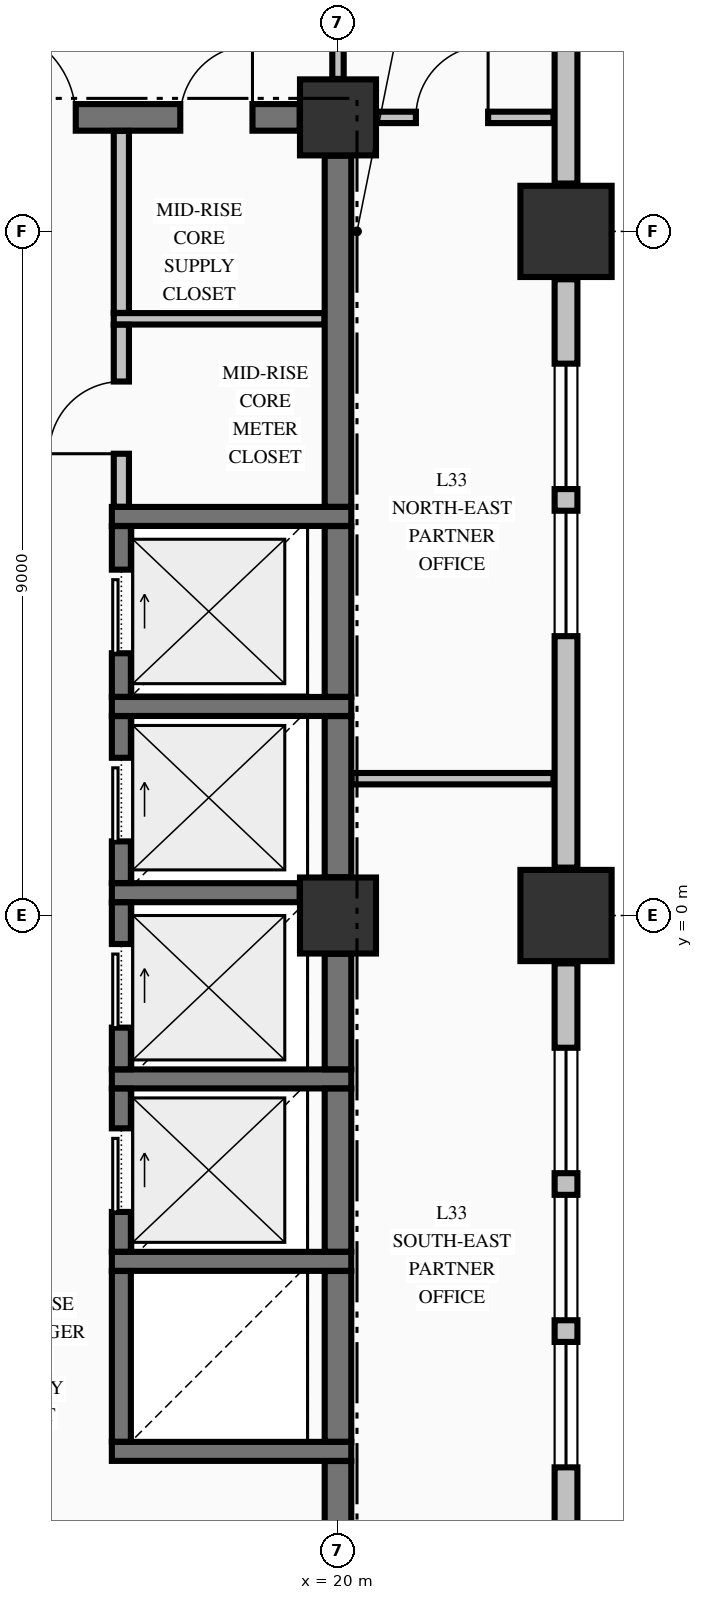
"""IFC4 building model, lengths in metres.
Left out: names, types, materials, properties, quantities, classifications, styles, units other than length and angle.
Written with IfcOpenShell. Run it as: python <this file> out.ifc"""

import sys

from ifc_helpers import new_model, si_unit, direction, frame, frame_2d, origin, origin_2d, place, context, subcontext, project, spatial, rectangle, extrude, element, fill, save


model = new_model("IFC4")
c1 = context("Model", 3, precision=1e-05, world=origin(), true_north=direction((0.0, 1.0)))
c2 = subcontext(c1, "Body", "Model", "MODEL_VIEW")
j1 = project(units=[si_unit("LENGTHUNIT", "METRE"), si_unit("PLANEANGLEUNIT", "RADIAN")], contexts=[c1])
p1 = place(None, origin())
s1 = spatial("IfcSite", under=j1, at=p1, CompositionType="ELEMENT")
p2 = place(p1, origin())
s2 = spatial("IfcBuilding", under=s1, at=p2, CompositionType="ELEMENT")
p3 = place(p2, frame((0.0, 0.0, 132.06)))
s3 = spatial("IfcBuildingStorey", under=s2, at=p3, CompositionType="ELEMENT", Elevation=132.06)
for number, where, z_axis, x_axis in (
    (1, (23.0, 0.0, -0.25), (0.0, 0.0, 1.0), (1.0, 0.0, 0.0)),
    (2, (23.0, 9.0, -0.25), (0.0, 0.0, 1.0), (1.0, 0.0, 0.0)),
):
    element("IfcColumn", number, at=place(p3, frame(where, z_axis=z_axis, x_axis=x_axis)), inside=s3, PredefinedType="COLUMN", context=c2, shape_type="SweptSolid", body=[
        extrude(rectangle(XDim=1.2, YDim=1.2, at=origin_2d()), origin(), (0.0, 0.0, 1.0), 3.57),
    ])
for number, where, z_axis, x_axis in (
    (3, (20.0, 10.5, -0.25), (0.0, 0.0, 1.0), (1.0, 0.0, 0.0)),
    (4, (20.0, 0.0, -0.25), (0.0, 0.0, 1.0), (1.0, 0.0, 0.0)),
):
    element("IfcColumn", number, at=place(p3, frame(where, z_axis=z_axis, x_axis=x_axis)), inside=s3, PredefinedType="COLUMN", context=c2, shape_type="SweptSolid", body=[
        extrude(rectangle(XDim=1.0, YDim=1.0, at=origin_2d()), origin(), (0.0, 0.0, 1.0), 3.57),
    ])
p4 = place(p3, frame((23.0, -8.37, 0.0), z_axis=(0.0, 0.0, 1.0), x_axis=(0.0, 1.0, 0.0)))
e5 = element("IfcWall", 5, at=p4, inside=s3, PredefinedType="STANDARD", context=c2, shape_type="SweptSolid", body=[
    extrude(rectangle(XDim=7.74, YDim=0.3, at=frame_2d((3.87, 0.0))), origin(), (0.0, 0.0, 1.0), 2.712),
])
p5 = place(p4, frame((1.11, 0.0, 0.8)))
e6 = element("IfcOpeningElement", 6, at=p5, cuts=e5, PredefinedType="OPENING", context=c2, shape_type="SweptSolid", body=[
    extrude(rectangle(XDim=1.65, YDim=1.7, at=frame_2d((0.825, 0.85))), frame((0.0, 0.16, 0.0), z_axis=(0.0, -1.0, 0.0), x_axis=(1.0, 0.0, 0.0)), (0.0, 0.0, 1.0), 0.32),
])
p6 = place(p4, frame((3.045, 0.0, 0.8)))
e7 = element("IfcOpeningElement", 7, at=p6, cuts=e5, PredefinedType="OPENING", context=c2, shape_type="SweptSolid", body=[
    extrude(rectangle(XDim=1.65, YDim=1.7, at=frame_2d((0.825, 0.85))), frame((0.0, 0.16, 0.0), z_axis=(0.0, -1.0, 0.0), x_axis=(1.0, 0.0, 0.0)), (0.0, 0.0, 1.0), 0.32),
])
p7 = place(p4, frame((4.98, 0.0, 0.8)))
e8 = element("IfcOpeningElement", 8, at=p7, cuts=e5, PredefinedType="OPENING", context=c2, shape_type="SweptSolid", body=[
    extrude(rectangle(XDim=1.65, YDim=1.7, at=frame_2d((0.825, 0.85))), frame((0.0, 0.16, 0.0), z_axis=(0.0, -1.0, 0.0), x_axis=(1.0, 0.0, 0.0)), (0.0, 0.0, 1.0), 0.32),
])
p8 = place(p3, frame((23.0, 0.63, 0.0), z_axis=(0.0, 0.0, 1.0), x_axis=(0.0, 1.0, 0.0)))
e9 = element("IfcWall", 9, at=p8, inside=s3, PredefinedType="STANDARD", context=c2, shape_type="SweptSolid", body=[
    extrude(rectangle(XDim=7.74, YDim=0.3, at=frame_2d((3.87, 0.0))), origin(), (0.0, 0.0, 1.0), 2.712),
])
p9 = place(p8, frame((3.045, 0.0, 0.8)))
e10 = element("IfcOpeningElement", 10, at=p9, cuts=e9, PredefinedType="OPENING", context=c2, shape_type="SweptSolid", body=[
    extrude(rectangle(XDim=1.65, YDim=1.7, at=frame_2d((0.825, 0.85))), frame((0.0, 0.16, 0.0), z_axis=(0.0, -1.0, 0.0), x_axis=(1.0, 0.0, 0.0)), (0.0, 0.0, 1.0), 0.32),
])
p10 = place(p8, frame((4.98, 0.0, 0.8)))
e11 = element("IfcOpeningElement", 11, at=p10, cuts=e9, PredefinedType="OPENING", context=c2, shape_type="SweptSolid", body=[
    extrude(rectangle(XDim=1.65, YDim=1.7, at=frame_2d((0.825, 0.85))), frame((0.0, 0.16, 0.0), z_axis=(0.0, -1.0, 0.0), x_axis=(1.0, 0.0, 0.0)), (0.0, 0.0, 1.0), 0.32),
])
p11 = place(p3, frame((23.0, 9.63, 0.0), z_axis=(0.0, 0.0, 1.0), x_axis=(0.0, 1.0, 0.0)))
e12 = element("IfcWall", 12, at=p11, inside=s3, PredefinedType="STANDARD", context=c2, shape_type="SweptSolid", body=[
    extrude(rectangle(XDim=10.74, YDim=0.3, at=frame_2d((5.37, 0.0))), origin(), (0.0, 0.0, 1.0), 2.712),
])
for number, where, z_axis, x_axis in (
    (13, (17.025, -7.05, 0.0), (0.0, 0.0, 1.0), (1.0, 0.0, 0.0)),
    (14, (17.025, -4.55, 0.0), (0.0, 0.0, 1.0), (1.0, 0.0, 0.0)),
    (15, (17.025, -2.15, 0.0), (0.0, 0.0, 1.0), (1.0, 0.0, 0.0)),
):
    element("IfcWall", number, at=place(p3, frame(where, z_axis=z_axis, x_axis=x_axis)), inside=s3, PredefinedType="SOLIDWALL", context=c2, shape_type="SweptSolid", body=[
        extrude(rectangle(XDim=3.15, YDim=0.25, at=frame_2d((1.575, 0.0))), origin(), (0.0, 0.0, 1.0), 3.32),
    ])
p12 = place(p3, frame((17.025, 0.3, 0.0), z_axis=(0.0, 0.0, 1.0), x_axis=(1.0, 0.0, 0.0)))
e16 = element("IfcWall", 16, at=p12, inside=s3, PredefinedType="SOLIDWALL", context=c2, shape_type="SweptSolid", body=[
    extrude(rectangle(XDim=2.471, YDim=0.25, at=frame_2d((1.236, 0.0))), origin(), (0.0, 0.0, 1.0), 3.32),
])
for number, where, z_axis, x_axis in (
    (17, (17.025, 2.75, 0.0), (0.0, 0.0, 1.0), (1.0, 0.0, 0.0)),
    (18, (17.025, 5.25, 0.0), (0.0, 0.0, 1.0), (1.0, 0.0, 0.0)),
):
    element("IfcWall", number, at=place(p3, frame(where, z_axis=z_axis, x_axis=x_axis)), inside=s3, PredefinedType="SOLIDWALL", context=c2, shape_type="SweptSolid", body=[
        extrude(rectangle(XDim=3.15, YDim=0.25, at=frame_2d((1.575, 0.0))), origin(), (0.0, 0.0, 1.0), 3.32),
    ])
p13 = place(p3, frame((14.7, 10.5, 0.0), z_axis=(0.0, 0.0, 1.0), x_axis=(1.0, 0.0, 0.0)))
e19 = element("IfcWall", 19, at=p13, inside=s3, PredefinedType="SHEAR", context=c2, shape_type="SweptSolid", body=[
    extrude(rectangle(XDim=4.796, YDim=0.35, at=frame_2d((2.398, 0.0))), origin(), (0.0, 0.0, 1.0), 3.32),
])
p14 = place(p13, frame((0.65, 0.0, 0.0)))
e20 = element("IfcOpeningElement", 20, at=p14, cuts=e19, PredefinedType="OPENING", context=c2, shape_type="SweptSolid", body=[
    extrude(rectangle(XDim=1.2, YDim=2.15, at=frame_2d((0.6, 1.075))), frame((0.0, 0.185, 0.0), z_axis=(0.0, -1.0, 0.0), x_axis=(1.0, 0.0, 0.0)), (0.0, 0.0, 1.0), 0.37),
])
p15 = place(p13, frame((3.225, 0.0, 0.0)))
e21 = element("IfcOpeningElement", 21, at=p15, cuts=e19, PredefinedType="OPENING", context=c2, shape_type="SweptSolid", body=[
    extrude(rectangle(XDim=0.95, YDim=2.15, at=frame_2d((0.475, 1.075))), frame((0.0, 0.185, 0.0), z_axis=(0.0, -1.0, 0.0), x_axis=(1.0, 0.0, 0.0)), (0.0, 0.0, 1.0), 0.37),
])
p16 = place(p3, frame((20.178, 1.8, 0.0), z_axis=(0.0, 0.0, 1.0), x_axis=(1.0, 0.0, 0.0)))
e22 = element("IfcWall", 22, at=p16, inside=s3, PredefinedType="PARTITIONING", context=c2, shape_type="SweptSolid", body=[
    extrude(rectangle(XDim=2.657, YDim=0.15, at=frame_2d((1.329, 0.0))), origin(), (0.0, 0.0, 1.0), 3.32),
])
p17 = place(p3, frame((17.05, 7.85, 0.0), z_axis=(0.0, 0.0, 1.0), x_axis=(1.0, 0.0, 0.0)))
e23 = element("IfcWall", 23, at=p17, inside=s3, PredefinedType="PARTITIONING", context=c2, shape_type="SweptSolid", body=[
    extrude(rectangle(XDim=2.772, YDim=0.15, at=frame_2d((1.386, 0.0))), origin(), (0.0, 0.0, 1.0), 3.32),
])
p18 = place(p3, frame((20.506, 10.5, 0.0), z_axis=(0.0, 0.0, 1.0), x_axis=(1.0, 0.0, 0.0)))
e24 = element("IfcWall", 24, at=p18, inside=s3, PredefinedType="PARTITIONING", context=c2, shape_type="SweptSolid", body=[
    extrude(rectangle(XDim=2.329, YDim=0.15, at=frame_2d((1.165, 0.0))), origin(), (0.0, 0.0, 1.0), 3.32),
])
p19 = place(p18, frame((0.519, 0.0, 0.0)))
e25 = element("IfcOpeningElement", 25, at=p19, cuts=e24, PredefinedType="OPENING", context=c2, shape_type="SweptSolid", body=[
    extrude(rectangle(XDim=0.95, YDim=2.15, at=frame_2d((0.475, 1.075))), frame((0.0, 0.085, 0.0), z_axis=(0.0, -1.0, 0.0), x_axis=(1.0, 0.0, 0.0)), (0.0, 0.0, 1.0), 0.17),
])
p20 = place(p3, frame((17.15, -6.923, 0.0), z_axis=(0.0, 0.0, 1.0), x_axis=(0.0, 1.0, 0.0)))
e26 = element("IfcWall", 26, at=p20, inside=s3, PredefinedType="SOLIDWALL", context=c2, shape_type="SweptSolid", body=[
    extrude(rectangle(XDim=2.246, YDim=0.25, at=frame_2d((1.123, 0.0))), origin(), (0.0, 0.0, 1.0), 3.32),
])
p21 = place(p3, frame((17.15, -4.423, 0.0), z_axis=(0.0, 0.0, 1.0), x_axis=(0.0, 1.0, 0.0)))
e27 = element("IfcWall", 27, at=p21, inside=s3, PredefinedType="SOLIDWALL", context=c2, shape_type="SweptSolid", body=[
    extrude(rectangle(XDim=2.146, YDim=0.25, at=frame_2d((1.073, 0.0))), origin(), (0.0, 0.0, 1.0), 3.32),
])
p22 = place(p21, frame((0.523, 0.0, 0.0)))
e28 = element("IfcOpeningElement", 28, at=p22, cuts=e27, PredefinedType="OPENING", context=c2, shape_type="SweptSolid", body=[
    extrude(rectangle(XDim=1.1, YDim=2.2, at=frame_2d((0.55, 1.1))), frame((0.0, 0.135, 0.0), z_axis=(0.0, -1.0, 0.0), x_axis=(1.0, 0.0, 0.0)), (0.0, 0.0, 1.0), 0.27),
])
p23 = place(p3, frame((17.15, -2.023, 0.0), z_axis=(0.0, 0.0, 1.0), x_axis=(0.0, 1.0, 0.0)))
e29 = element("IfcWall", 29, at=p23, inside=s3, PredefinedType="SOLIDWALL", context=c2, shape_type="SweptSolid", body=[
    extrude(rectangle(XDim=2.196, YDim=0.25, at=frame_2d((1.098, 0.0))), origin(), (0.0, 0.0, 1.0), 3.32),
])
p24 = place(p23, frame((0.548, 0.0, 0.0)))
e30 = element("IfcOpeningElement", 30, at=p24, cuts=e29, PredefinedType="OPENING", context=c2, shape_type="SweptSolid", body=[
    extrude(rectangle(XDim=1.1, YDim=2.2, at=frame_2d((0.55, 1.1))), frame((0.0, 0.135, 0.0), z_axis=(0.0, -1.0, 0.0), x_axis=(1.0, 0.0, 0.0)), (0.0, 0.0, 1.0), 0.27),
])
p25 = place(p3, frame((17.15, 0.427, 0.0), z_axis=(0.0, 0.0, 1.0), x_axis=(0.0, 1.0, 0.0)))
e31 = element("IfcWall", 31, at=p25, inside=s3, PredefinedType="SOLIDWALL", context=c2, shape_type="SweptSolid", body=[
    extrude(rectangle(XDim=2.196, YDim=0.25, at=frame_2d((1.098, 0.0))), origin(), (0.0, 0.0, 1.0), 3.32),
])
p26 = place(p25, frame((0.548, 0.0, 0.0)))
e32 = element("IfcOpeningElement", 32, at=p26, cuts=e31, PredefinedType="OPENING", context=c2, shape_type="SweptSolid", body=[
    extrude(rectangle(XDim=1.1, YDim=2.2, at=frame_2d((0.55, 1.1))), frame((0.0, 0.135, 0.0), z_axis=(0.0, -1.0, 0.0), x_axis=(1.0, 0.0, 0.0)), (0.0, 0.0, 1.0), 0.27),
])
p27 = place(p3, frame((17.15, 2.877, 0.0), z_axis=(0.0, 0.0, 1.0), x_axis=(0.0, 1.0, 0.0)))
e33 = element("IfcWall", 33, at=p27, inside=s3, PredefinedType="SOLIDWALL", context=c2, shape_type="SweptSolid", body=[
    extrude(rectangle(XDim=2.246, YDim=0.25, at=frame_2d((1.123, 0.0))), origin(), (0.0, 0.0, 1.0), 3.32),
])
p28 = place(p27, frame((0.573, 0.0, 0.0)))
e34 = element("IfcOpeningElement", 34, at=p28, cuts=e33, PredefinedType="OPENING", context=c2, shape_type="SweptSolid", body=[
    extrude(rectangle(XDim=1.1, YDim=2.2, at=frame_2d((0.55, 1.1))), frame((0.0, 0.135, 0.0), z_axis=(0.0, -1.0, 0.0), x_axis=(1.0, 0.0, 0.0)), (0.0, 0.0, 1.0), 0.27),
])
p29 = place(p3, frame((20.0, -9.446, 0.0), z_axis=(0.0, 0.0, 1.0), x_axis=(0.0, 1.0, 0.0)))
e35 = element("IfcWall", 35, at=p29, inside=s3, PredefinedType="SHEAR", context=c2, shape_type="SweptSolid", body=[
    extrude(rectangle(XDim=2.269, YDim=0.35, at=frame_2d((1.135, 0.0))), origin(), (0.0, 0.0, 1.0), 3.32),
])
p30 = place(p3, frame((20.0, -6.923, 0.0), z_axis=(0.0, 0.0, 1.0), x_axis=(0.0, 1.0, 0.0)))
e36 = element("IfcWall", 36, at=p30, inside=s3, PredefinedType="SHEAR", context=c2, shape_type="SweptSolid", body=[
    extrude(rectangle(XDim=2.246, YDim=0.35, at=frame_2d((1.123, 0.0))), origin(), (0.0, 0.0, 1.0), 3.32),
])
p31 = place(p3, frame((20.0, -4.423, 0.0), z_axis=(0.0, 0.0, 1.0), x_axis=(0.0, 1.0, 0.0)))
e37 = element("IfcWall", 37, at=p31, inside=s3, PredefinedType="SHEAR", context=c2, shape_type="SweptSolid", body=[
    extrude(rectangle(XDim=2.146, YDim=0.35, at=frame_2d((1.073, 0.0))), origin(), (0.0, 0.0, 1.0), 3.32),
])
p32 = place(p3, frame((20.0, -2.023, 0.0), z_axis=(0.0, 0.0, 1.0), x_axis=(0.0, 1.0, 0.0)))
e38 = element("IfcWall", 38, at=p32, inside=s3, PredefinedType="SHEAR", context=c2, shape_type="SweptSolid", body=[
    extrude(rectangle(XDim=1.519, YDim=0.35, at=frame_2d((0.76, 0.0))), origin(), (0.0, 0.0, 1.0), 3.32),
])
p33 = place(p3, frame((20.0, 0.504, 0.0), z_axis=(0.0, 0.0, 1.0), x_axis=(0.0, 1.0, 0.0)))
e39 = element("IfcWall", 39, at=p33, inside=s3, PredefinedType="SHEAR", context=c2, shape_type="SweptSolid", body=[
    extrude(rectangle(XDim=2.119, YDim=0.35, at=frame_2d((1.06, 0.0))), origin(), (0.0, 0.0, 1.0), 3.32),
])
p34 = place(p3, frame((20.0, 2.877, 0.0), z_axis=(0.0, 0.0, 1.0), x_axis=(0.0, 1.0, 0.0)))
e40 = element("IfcWall", 40, at=p34, inside=s3, PredefinedType="SHEAR", context=c2, shape_type="SweptSolid", body=[
    extrude(rectangle(XDim=2.246, YDim=0.35, at=frame_2d((1.123, 0.0))), origin(), (0.0, 0.0, 1.0), 3.32),
])
p35 = place(p3, frame((20.0, 5.377, 0.0), z_axis=(0.0, 0.0, 1.0), x_axis=(0.0, 1.0, 0.0)))
e41 = element("IfcWall", 41, at=p35, inside=s3, PredefinedType="SHEAR", context=c2, shape_type="SweptSolid", body=[
    extrude(rectangle(XDim=4.619, YDim=0.35, at=frame_2d((2.31, 0.0))), origin(), (0.0, 0.0, 1.0), 3.32),
])
p36 = place(p3, frame((17.15, 5.378, 0.0), z_axis=(0.0, 0.0, 1.0), x_axis=(0.0, 1.0, 0.0)))
e42 = element("IfcWall", 42, at=p36, inside=s3, PredefinedType="PARTITIONING", context=c2, shape_type="SweptSolid", body=[
    extrude(rectangle(XDim=2.394, YDim=0.2, at=frame_2d((1.197, 0.0))), origin(), (0.0, 0.0, 1.0), 3.32),
])
p37 = place(p36, frame((0.697, 0.0, 0.0)))
e43 = element("IfcOpeningElement", 43, at=p37, cuts=e42, PredefinedType="OPENING", context=c2, shape_type="SweptSolid", body=[
    extrude(rectangle(XDim=0.95, YDim=2.15, at=frame_2d((0.475, 1.075))), frame((0.0, 0.11, 0.0), z_axis=(0.0, -1.0, 0.0), x_axis=(1.0, 0.0, 0.0)), (0.0, 0.0, 1.0), 0.22),
])
p38 = place(p3, frame((17.15, 7.928, 0.0), z_axis=(0.0, 0.0, 1.0), x_axis=(0.0, 1.0, 0.0)))
e44 = element("IfcWall", 44, at=p38, inside=s3, PredefinedType="PARTITIONING", context=c2, shape_type="SweptSolid", body=[
    extrude(rectangle(XDim=2.394, YDim=0.2, at=frame_2d((1.197, 0.0))), origin(), (0.0, 0.0, 1.0), 3.32),
])
p39 = place(p3, frame((20.0, 11.006, 0.0), z_axis=(0.0, 0.0, 1.0), x_axis=(0.0, 1.0, 0.0)))
e45 = element("IfcWall", 45, at=p39, inside=s3, PredefinedType="PARTITIONING", context=c2, shape_type="SweptSolid", body=[
    extrude(rectangle(XDim=2.716, YDim=0.15, at=frame_2d((1.358, 0.0))), origin(), (0.0, 0.0, 1.0), 2.81),
])
p40 = place(p39, frame((0.669, 0.0, 0.0)))
e46 = element("IfcOpeningElement", 46, at=p40, cuts=e45, PredefinedType="OPENING", context=c2, shape_type="SweptSolid", body=[
    extrude(rectangle(XDim=0.95, YDim=2.15, at=frame_2d((0.475, 1.075))), frame((0.0, 0.085, 0.0), z_axis=(0.0, -1.0, 0.0), x_axis=(1.0, 0.0, 0.0)), (0.0, 0.0, 1.0), 0.17),
])
p41 = place(p5, origin())
e47 = element("IfcWindow", 47, at=p41, inside=s3, PartitioningType="SINGLE_PANEL", PredefinedType="WINDOW", context=c2, shape_type="SweptSolid", body=[
    extrude(rectangle(XDim=1.65, YDim=1.7, at=frame_2d((0.825, 0.85))), frame((0.0, 0.03, 0.0), z_axis=(0.0, -1.0, 0.0), x_axis=(1.0, 0.0, 0.0)), (0.0, 0.0, 1.0), 0.06),
])
fill(e6, e47)
p42 = place(p6, origin())
e48 = element("IfcWindow", 48, at=p42, inside=s3, PartitioningType="SINGLE_PANEL", PredefinedType="WINDOW", context=c2, shape_type="SweptSolid", body=[
    extrude(rectangle(XDim=1.65, YDim=1.7, at=frame_2d((0.825, 0.85))), frame((0.0, 0.03, 0.0), z_axis=(0.0, -1.0, 0.0), x_axis=(1.0, 0.0, 0.0)), (0.0, 0.0, 1.0), 0.06),
])
fill(e7, e48)
p43 = place(p7, origin())
e49 = element("IfcWindow", 49, at=p43, inside=s3, PartitioningType="SINGLE_PANEL", PredefinedType="WINDOW", context=c2, shape_type="SweptSolid", body=[
    extrude(rectangle(XDim=1.65, YDim=1.7, at=frame_2d((0.825, 0.85))), frame((0.0, 0.03, 0.0), z_axis=(0.0, -1.0, 0.0), x_axis=(1.0, 0.0, 0.0)), (0.0, 0.0, 1.0), 0.06),
])
fill(e8, e49)
p44 = place(p9, origin())
e50 = element("IfcWindow", 50, at=p44, inside=s3, PartitioningType="SINGLE_PANEL", PredefinedType="WINDOW", context=c2, shape_type="SweptSolid", body=[
    extrude(rectangle(XDim=1.65, YDim=1.7, at=frame_2d((0.825, 0.85))), frame((0.0, 0.03, 0.0), z_axis=(0.0, -1.0, 0.0), x_axis=(1.0, 0.0, 0.0)), (0.0, 0.0, 1.0), 0.06),
])
fill(e10, e50)
p45 = place(p10, origin())
e51 = element("IfcWindow", 51, at=p45, inside=s3, PartitioningType="SINGLE_PANEL", PredefinedType="WINDOW", context=c2, shape_type="SweptSolid", body=[
    extrude(rectangle(XDim=1.65, YDim=1.7, at=frame_2d((0.825, 0.85))), frame((0.0, 0.03, 0.0), z_axis=(0.0, -1.0, 0.0), x_axis=(1.0, 0.0, 0.0)), (0.0, 0.0, 1.0), 0.06),
])
fill(e11, e51)
p46 = place(p22, origin())
e52 = element("IfcDoor", 52, at=p46, inside=s3, OperationType="SLIDING_TO_RIGHT", PredefinedType="DOOR", context=c2, shape_type="SweptSolid", body=[
    extrude(rectangle(XDim=1.1, YDim=2.2, at=frame_2d((0.55, 1.1))), frame((0.0, 0.025, 0.0), z_axis=(0.0, -1.0, 0.0), x_axis=(1.0, 0.0, 0.0)), (0.0, 0.0, 1.0), 0.05),
])
fill(e28, e52)
p47 = place(p24, origin())
e53 = element("IfcDoor", 53, at=p47, inside=s3, OperationType="SLIDING_TO_RIGHT", PredefinedType="DOOR", context=c2, shape_type="SweptSolid", body=[
    extrude(rectangle(XDim=1.1, YDim=2.2, at=frame_2d((0.55, 1.1))), frame((0.0, 0.025, 0.0), z_axis=(0.0, -1.0, 0.0), x_axis=(1.0, 0.0, 0.0)), (0.0, 0.0, 1.0), 0.05),
])
fill(e30, e53)
p48 = place(p26, origin())
e54 = element("IfcDoor", 54, at=p48, inside=s3, OperationType="SLIDING_TO_RIGHT", PredefinedType="DOOR", context=c2, shape_type="SweptSolid", body=[
    extrude(rectangle(XDim=1.1, YDim=2.2, at=frame_2d((0.55, 1.1))), frame((0.0, 0.025, 0.0), z_axis=(0.0, -1.0, 0.0), x_axis=(1.0, 0.0, 0.0)), (0.0, 0.0, 1.0), 0.05),
])
fill(e32, e54)
p49 = place(p28, origin())
e55 = element("IfcDoor", 55, at=p49, inside=s3, OperationType="SLIDING_TO_RIGHT", PredefinedType="DOOR", context=c2, shape_type="SweptSolid", body=[
    extrude(rectangle(XDim=1.1, YDim=2.2, at=frame_2d((0.55, 1.1))), frame((0.0, 0.025, 0.0), z_axis=(0.0, -1.0, 0.0), x_axis=(1.0, 0.0, 0.0)), (0.0, 0.0, 1.0), 0.05),
])
fill(e34, e55)
p50 = place(p14, origin())
e56 = element("IfcDoor", 56, at=p50, inside=s3, OperationType="SINGLE_SWING_LEFT", PredefinedType="DOOR", context=c2, shape_type="SweptSolid", body=[
    extrude(rectangle(XDim=1.2, YDim=2.15, at=frame_2d((0.6, 1.075))), frame((0.0, 0.025, 0.0), z_axis=(0.0, -1.0, 0.0), x_axis=(1.0, 0.0, 0.0)), (0.0, 0.0, 1.0), 0.05),
])
fill(e20, e56)
p51 = place(p15, origin())
e57 = element("IfcDoor", 57, at=p51, inside=s3, OperationType="SINGLE_SWING_RIGHT", PredefinedType="DOOR", context=c2, shape_type="SweptSolid", body=[
    extrude(rectangle(XDim=0.95, YDim=2.15, at=frame_2d((0.475, 1.075))), frame((0.0, 0.025, 0.0), z_axis=(0.0, -1.0, 0.0), x_axis=(1.0, 0.0, 0.0)), (0.0, 0.0, 1.0), 0.05),
])
fill(e21, e57)
p52 = place(p37, origin())
e58 = element("IfcDoor", 58, at=p52, inside=s3, OperationType="SINGLE_SWING_LEFT", PredefinedType="DOOR", context=c2, shape_type="SweptSolid", body=[
    extrude(rectangle(XDim=0.95, YDim=2.15, at=frame_2d((0.475, 1.075))), frame((0.0, 0.025, 0.0), z_axis=(0.0, -1.0, 0.0), x_axis=(1.0, 0.0, 0.0)), (0.0, 0.0, 1.0), 0.05),
])
fill(e43, e58)
p53 = place(p19, origin())
e59 = element("IfcDoor", 59, at=p53, inside=s3, OperationType="SINGLE_SWING_RIGHT", PredefinedType="DOOR", context=c2, shape_type="SweptSolid", body=[
    extrude(rectangle(XDim=0.95, YDim=2.15, at=frame_2d((0.475, 1.075))), frame((0.0, 0.025, 0.0), z_axis=(0.0, -1.0, 0.0), x_axis=(1.0, 0.0, 0.0)), (0.0, 0.0, 1.0), 0.05),
])
fill(e25, e59)
save(model, sys.argv[1])
